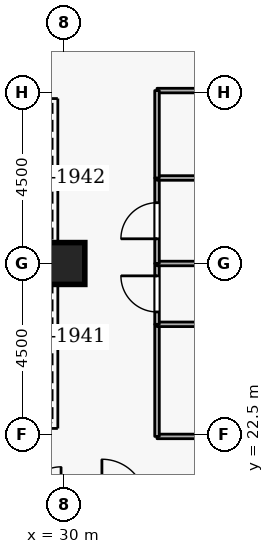
"""IFC4 building model, lengths in metres.
Left out: names, types, materials, properties, quantities, classifications, styles, units other than length and angle.
Written with IfcOpenShell. Run it as: python <this file> out.ifc"""

import sys

from ifc_helpers import new_model, si_unit, direction, frame, frame_2d, origin, origin_2d, place, context, subcontext, project, spatial, rectangle, extrude, element, fill, save


model = new_model("IFC4")
c1 = context("Model", 3, precision=1e-05, world=origin(), true_north=direction((0.0, 1.0)))
c2 = subcontext(c1, "Body", "Model", "MODEL_VIEW")
j1 = project(units=[si_unit("LENGTHUNIT", "METRE"), si_unit("PLANEANGLEUNIT", "RADIAN")], contexts=[c1])
p1 = place(None, origin())
s1 = spatial("IfcSite", under=j1, at=p1, CompositionType="ELEMENT")
p2 = place(p1, origin())
s2 = spatial("IfcBuilding", under=s1, at=p2, CompositionType="ELEMENT")
p3 = place(p2, frame((0.0, 0.0, 163.5)))
s3 = spatial("IfcBuildingStorey", under=s2, at=p3, CompositionType="ELEMENT", Elevation=163.5)
p4 = place(p3, frame((30.0, 27.0, 0.0), z_axis=(0.0, 0.0, 1.0), x_axis=(1.0, 0.0, 0.0)))
e1 = element("IfcColumn", 1, at=p4, inside=s3, PredefinedType="COLUMN", context=c2, shape_type="SweptSolid", body=[
    extrude(rectangle(XDim=1.1, YDim=1.1, at=origin_2d()), origin(), (0.0, 0.0, 1.0), 3.6),
])
p5 = place(p3, frame((37.75, 22.45, 0.0), z_axis=(0.0, 0.0, 1.0), x_axis=(-1.0, 0.0, 0.0)))
e2 = element("IfcWall", 2, at=p5, inside=s3, PredefinedType="PARTITIONING", context=c2, shape_type="SweptSolid", body=[
    extrude(rectangle(XDim=5.3, YDim=0.12, at=frame_2d((2.65, 0.0))), origin(), (0.0, 0.0, 1.0), 3.34),
])
p6 = place(p5, frame((2.125, 0.0, 0.0)))
e3 = element("IfcOpeningElement", 3, at=p6, cuts=e2, PredefinedType="OPENING", context=c2, shape_type="SweptSolid", body=[
    extrude(rectangle(XDim=1.05, YDim=2.1, at=frame_2d((0.525, 1.05))), frame((0.0, 0.07, 0.0), z_axis=(0.0, -1.0, 0.0), x_axis=(1.0, 0.0, 0.0)), (0.0, 0.0, 1.0), 0.14),
])
p7 = place(p3, frame((32.45, 22.45, 0.0), z_axis=(0.0, 0.0, 1.0), x_axis=(0.0, 1.0, 0.0)))
e4 = element("IfcWall", 4, at=p7, inside=s3, PredefinedType="PARTITIONING", context=c2, shape_type="SweptSolid", body=[
    extrude(rectangle(XDim=2.95, YDim=0.12, at=frame_2d((1.475, 0.0))), origin(), (0.0, 0.0, 1.0), 3.34),
])
p8 = place(p3, frame((32.45, 25.4, 0.0), z_axis=(0.0, 0.0, 1.0), x_axis=(1.0, 0.0, 0.0)))
e5 = element("IfcWall", 5, at=p8, inside=s3, PredefinedType="PARTITIONING", context=c2, shape_type="SweptSolid", body=[
    extrude(rectangle(XDim=16.77, YDim=0.12, at=frame_2d((8.385, 0.0))), origin(), (0.0, 0.0, 1.0), 3.34),
])
p9 = place(p3, frame((32.45, 25.4, 0.0), z_axis=(0.0, 0.0, 1.0), x_axis=(0.0, 1.0, 0.0)))
e6 = element("IfcWall", 6, at=p9, inside=s3, PredefinedType="PARTITIONING", context=c2, shape_type="SweptSolid", body=[
    extrude(rectangle(XDim=1.6, YDim=0.12, at=frame_2d((0.8, 0.0))), origin(), (0.0, 0.0, 1.0), 3.34),
])
p10 = place(p9, frame((0.325, 0.0, 0.0)))
e7 = element("IfcOpeningElement", 7, at=p10, cuts=e6, PredefinedType="OPENING", context=c2, shape_type="SweptSolid", body=[
    extrude(rectangle(XDim=0.95, YDim=2.1, at=frame_2d((0.475, 1.05))), frame((0.0, 0.07, 0.0), z_axis=(0.0, -1.0, 0.0), x_axis=(1.0, 0.0, 0.0)), (0.0, 0.0, 1.0), 0.14),
])
p11 = place(p3, frame((32.45, 27.0, 0.0), z_axis=(0.0, 0.0, 1.0), x_axis=(1.0, 0.0, 0.0)))
e8 = element("IfcWall", 8, at=p11, inside=s3, PredefinedType="PARTITIONING", context=c2, shape_type="SweptSolid", body=[
    extrude(rectangle(XDim=16.77, YDim=0.12, at=frame_2d((8.385, 0.0))), origin(), (0.0, 0.0, 1.0), 2.878),
])
p12 = place(p3, frame((32.45, 27.0, 0.0), z_axis=(0.0, 0.0, 1.0), x_axis=(0.0, 1.0, 0.0)))
e9 = element("IfcWall", 9, at=p12, inside=s3, PredefinedType="PARTITIONING", context=c2, shape_type="SweptSolid", body=[
    extrude(rectangle(XDim=2.25, YDim=0.12, at=frame_2d((1.125, 0.0))), origin(), (0.0, 0.0, 1.0), 3.34),
])
p13 = place(p12, frame((0.65, 0.0, 0.0)))
e10 = element("IfcOpeningElement", 10, at=p13, cuts=e9, PredefinedType="OPENING", context=c2, shape_type="SweptSolid", body=[
    extrude(rectangle(XDim=0.95, YDim=2.1, at=frame_2d((0.475, 1.05))), frame((0.0, 0.07, 0.0), z_axis=(0.0, -1.0, 0.0), x_axis=(1.0, 0.0, 0.0)), (0.0, 0.0, 1.0), 0.14),
])
p14 = place(p3, frame((32.45, 29.25, 0.0), z_axis=(0.0, 0.0, 1.0), x_axis=(1.0, 0.0, 0.0)))
e11 = element("IfcWall", 11, at=p14, inside=s3, PredefinedType="PARTITIONING", context=c2, shape_type="SweptSolid", body=[
    extrude(rectangle(XDim=16.77, YDim=0.12, at=frame_2d((8.385, 0.0))), origin(), (0.0, 0.0, 1.0), 3.34),
])
p15 = place(p3, frame((32.45, 31.55, 0.0), z_axis=(0.0, 0.0, 1.0), x_axis=(1.0, 0.0, 0.0)))
e12 = element("IfcWall", 12, at=p15, inside=s3, PredefinedType="PARTITIONING", context=c2, shape_type="SweptSolid", body=[
    extrude(rectangle(XDim=3.35, YDim=0.12, at=frame_2d((1.675, 0.0))), origin(), (0.0, 0.0, 1.0), 3.34),
])
p16 = place(p15, frame((1.15, 0.0, 0.0)))
e13 = element("IfcOpeningElement", 13, at=p16, cuts=e12, PredefinedType="OPENING", context=c2, shape_type="SweptSolid", body=[
    extrude(rectangle(XDim=1.05, YDim=2.1, at=frame_2d((0.525, 1.05))), frame((0.0, 0.07, 0.0), z_axis=(0.0, -1.0, 0.0), x_axis=(1.0, 0.0, 0.0)), (0.0, 0.0, 1.0), 0.14),
])
p17 = place(p3, frame((32.45, 29.25, 0.0), z_axis=(0.0, 0.0, 1.0), x_axis=(0.0, 1.0, 0.0)))
e14 = element("IfcWall", 14, at=p17, inside=s3, PredefinedType="PARTITIONING", context=c2, shape_type="SweptSolid", body=[
    extrude(rectangle(XDim=2.3, YDim=0.12, at=frame_2d((1.15, 0.0))), origin(), (0.0, 0.0, 1.0), 3.34),
])
p18 = place(p10, origin())
e15 = element("IfcDoor", 15, at=p18, inside=s3, OperationType="SINGLE_SWING_RIGHT", PredefinedType="DOOR", context=c2, shape_type="SweptSolid", body=[
    extrude(rectangle(XDim=0.95, YDim=2.1, at=frame_2d((0.475, 1.05))), frame((0.0, 0.025, 0.0), z_axis=(0.0, -1.0, 0.0), x_axis=(1.0, 0.0, 0.0)), (0.0, 0.0, 1.0), 0.05),
])
fill(e7, e15)
p19 = place(p13, origin())
e16 = element("IfcDoor", 16, at=p19, inside=s3, OperationType="SINGLE_SWING_LEFT", PredefinedType="DOOR", context=c2, shape_type="SweptSolid", body=[
    extrude(rectangle(XDim=0.95, YDim=2.1, at=frame_2d((0.475, 1.05))), frame((0.0, 0.025, 0.0), z_axis=(0.0, -1.0, 0.0), x_axis=(1.0, 0.0, 0.0)), (0.0, 0.0, 1.0), 0.05),
])
fill(e10, e16)
save(model, sys.argv[1])
